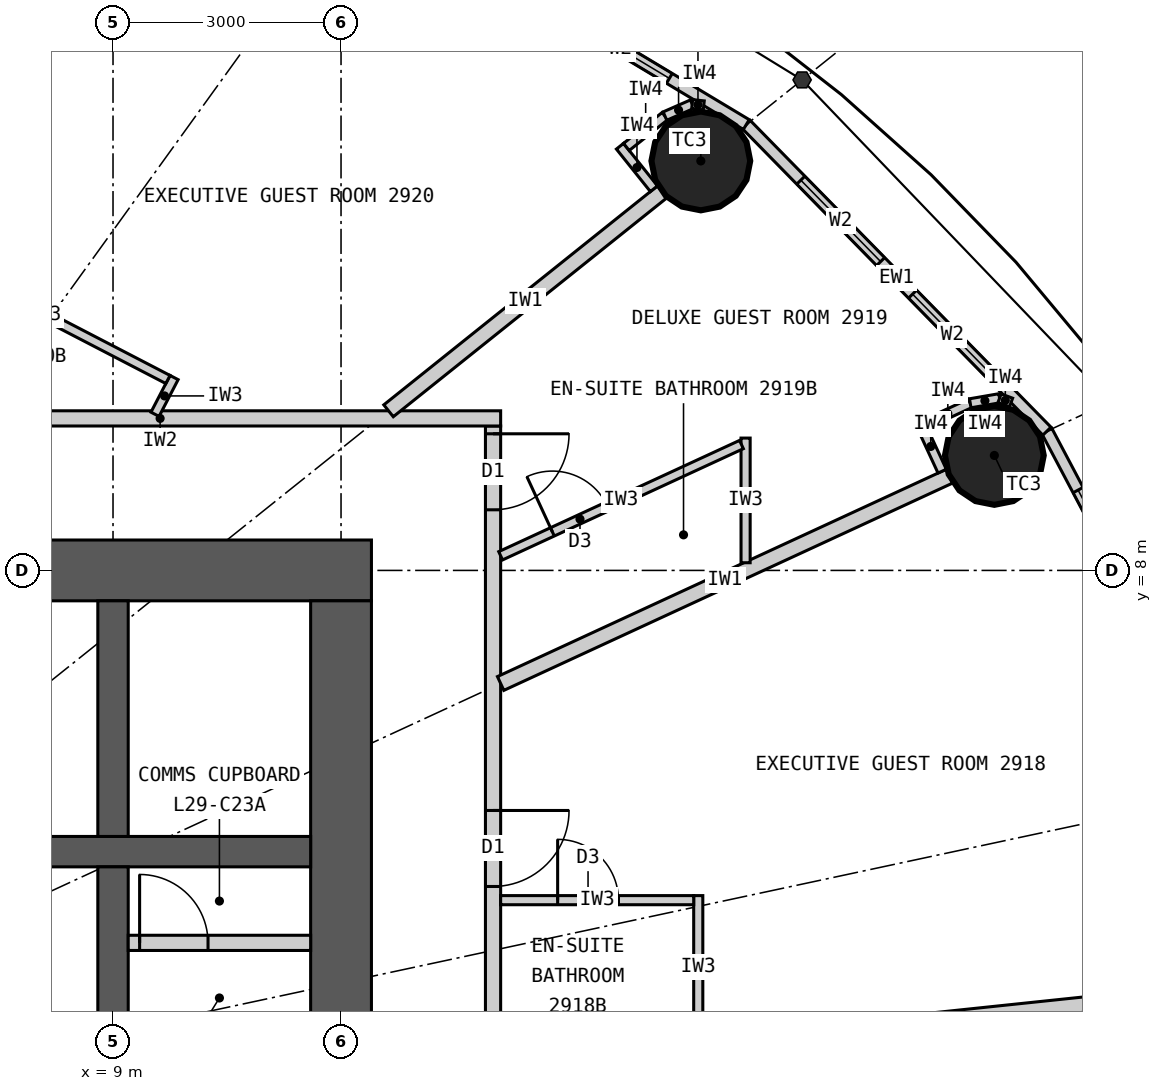
"""IFC4 building model, lengths in metres.
Left out: names, types, materials, properties, quantities, classifications, styles, units other than length and angle.
Written with IfcOpenShell. Run it as: python <this file> out.ifc"""

import sys

from ifc_helpers import new_model, si_unit, direction, frame, frame_2d, origin, origin_2d, place, context, subcontext, project, spatial, rectangle, circle, extrude, element, fill, save


model = new_model("IFC4")
c1 = context("Model", 3, precision=1e-05, world=origin(), true_north=direction((0.0, 1.0)))
c2 = subcontext(c1, "Body", "Model", "MODEL_VIEW")
j1 = project(units=[si_unit("LENGTHUNIT", "METRE"), si_unit("PLANEANGLEUNIT", "RADIAN")], contexts=[c1])
p1 = place(None, origin())
s1 = spatial("IfcSite", under=j1, at=p1, CompositionType="ELEMENT")
p2 = place(p1, origin())
s2 = spatial("IfcBuilding", under=s1, at=p2, CompositionType="ELEMENT")
p3 = place(p2, frame((0.0, 0.0, 115.5)))
s3 = spatial("IfcBuildingStorey", under=s2, at=p3, CompositionType="ELEMENT", Elevation=115.5)
for number, where, z_axis, x_axis in (
    (1, (20.596, 9.513, 0.0), (0.0, 0.0, 1.0), (1.0, 0.0, 0.0)),
    (2, (16.734, 13.387, 0.0), (0.0, 0.0, 1.0), (1.0, 0.0, 0.0)),
):
    element("IfcColumn", number, at=place(p3, frame(where, z_axis=z_axis, x_axis=x_axis)), inside=s3, PredefinedType="COLUMN", context=c2, shape_type="SweptSolid", body=[
        extrude(circle(Radius=0.65, at=origin_2d()), origin(), (0.0, 0.0, 1.0), 3.3),
    ])
p4 = place(p3, frame((-12.4, 8.0, 0.0), z_axis=(0.0, 0.0, 1.0), x_axis=(1.0, 0.0, 0.0)))
e3 = element("IfcWall", 3, at=p4, inside=s3, PredefinedType="SHEAR", context=c2, shape_type="SweptSolid", body=[
    extrude(rectangle(XDim=24.8, YDim=0.8, at=frame_2d((12.4, 0.0))), origin(), (0.0, 0.0, 1.0), 3.3),
])
p5 = place(p4, frame((11.1, 0.0, 0.0)))
e4 = element("IfcOpeningElement", 4, at=p5, cuts=e3, PredefinedType="OPENING", context=c2, shape_type="SweptSolid", body=[
    extrude(rectangle(XDim=1.2, YDim=2.2, at=frame_2d((0.6, 1.1))), frame((0.0, 0.41, 0.0), z_axis=(0.0, -1.0, 0.0), x_axis=(1.0, 0.0, 0.0)), (0.0, 0.0, 1.0), 0.82),
])
p6 = place(p4, frame((18.7, 0.0, 0.0)))
e5 = element("IfcOpeningElement", 5, at=p6, cuts=e3, PredefinedType="OPENING", context=c2, shape_type="SweptSolid", body=[
    extrude(rectangle(XDim=0.9, YDim=2.2, at=frame_2d((0.45, 1.1))), frame((0.0, 0.41, 0.0), z_axis=(0.0, -1.0, 0.0), x_axis=(1.0, 0.0, 0.0)), (0.0, 0.0, 1.0), 0.82),
])
p7 = place(p3, frame((12.0, -7.6, 0.0), z_axis=(0.0, 0.0, 1.0), x_axis=(0.0, 1.0, 0.0)))
e6 = element("IfcWall", 6, at=p7, inside=s3, PredefinedType="SHEAR", context=c2, shape_type="SweptSolid", body=[
    extrude(rectangle(XDim=15.2, YDim=0.8, at=frame_2d((7.6, 0.0))), origin(), (0.0, 0.0, 1.0), 3.3),
])
p8 = place(p7, frame((6.7, 0.0, 0.0)))
e7 = element("IfcOpeningElement", 7, at=p8, cuts=e6, PredefinedType="OPENING", context=c2, shape_type="SweptSolid", body=[
    extrude(rectangle(XDim=1.8, YDim=2.2, at=frame_2d((0.9, 1.1))), frame((0.0, 0.41, 0.0), z_axis=(0.0, -1.0, 0.0), x_axis=(1.0, 0.0, 0.0)), (0.0, 0.0, 1.0), 0.82),
])
p9 = place(p3, frame((-11.6, 4.3, 0.0), z_axis=(0.0, 0.0, 1.0), x_axis=(1.0, 0.0, 0.0)))
e8 = element("IfcWall", 8, at=p9, inside=s3, PredefinedType="SHEAR", context=c2, shape_type="SweptSolid", body=[
    extrude(rectangle(XDim=23.2, YDim=0.4, at=frame_2d((11.6, 0.0))), origin(), (0.0, 0.0, 1.0), 3.3),
])
p10 = place(p3, frame((9.0, 4.5, 0.0), z_axis=(0.0, 0.0, 1.0), x_axis=(0.0, 1.0, 0.0)))
e9 = element("IfcWall", 9, at=p10, inside=s3, PredefinedType="SHEAR", context=c2, shape_type="SweptSolid", body=[
    extrude(rectangle(XDim=3.1, YDim=0.4, at=frame_2d((1.55, 0.0))), origin(), (0.0, 0.0, 1.0), 3.3),
])
p11 = place(p3, frame((9.0, 1.75, 0.0), z_axis=(0.0, 0.0, 1.0), x_axis=(0.0, 1.0, 0.0)))
e10 = element("IfcWall", 10, at=p11, inside=s3, PredefinedType="SHEAR", context=c2, shape_type="SweptSolid", body=[
    extrude(rectangle(XDim=2.35, YDim=0.4, at=frame_2d((1.175, 0.0))), origin(), (0.0, 0.0, 1.0), 3.3),
])
p12 = place(p3, frame((23.792, 5.1, 0.0), z_axis=(0.0, 0.0, 1.0), x_axis=(-0.467814388454, 0.883826735257, 0.0)))
e11 = element("IfcWall", 11, at=p12, inside=s3, PredefinedType="ELEMENTEDWALL", context=c2, shape_type="SweptSolid", body=[
    extrude(rectangle(XDim=5.354, YDim=0.15, at=frame_2d((2.677, 0.0))), origin(), (0.0, 0.0, 1.0), 3.12),
])
p13 = place(p12, frame((0.877, 0.0, 0.9)))
e12 = element("IfcOpeningElement", 12, at=p13, cuts=e11, PredefinedType="OPENING", context=c2, shape_type="SweptSolid", body=[
    extrude(rectangle(XDim=1.5, YDim=1.9, at=frame_2d((0.75, 0.95))), frame((0.0, 0.085, 0.0), z_axis=(0.0, -1.0, 0.0), x_axis=(1.0, 0.0, 0.0)), (0.0, 0.0, 1.0), 0.17),
])
p14 = place(p12, frame((2.977, 0.0, 0.9)))
e13 = element("IfcOpeningElement", 13, at=p14, cuts=e11, PredefinedType="OPENING", context=c2, shape_type="SweptSolid", body=[
    extrude(rectangle(XDim=1.5, YDim=1.9, at=frame_2d((0.75, 0.95))), frame((0.0, 0.085, 0.0), z_axis=(0.0, -1.0, 0.0), x_axis=(1.0, 0.0, 0.0)), (0.0, 0.0, 1.0), 0.17),
])
p15 = place(p3, frame((21.287, 9.832, 0.0), z_axis=(0.0, 0.0, 1.0), x_axis=(-0.700136650834, 0.714008872605, 0.0)))
e14 = element("IfcWall", 14, at=p15, inside=s3, PredefinedType="ELEMENTEDWALL", context=c2, shape_type="SweptSolid", body=[
    extrude(rectangle(XDim=5.649, YDim=0.15, at=frame_2d((2.825, 0.0))), origin(), (0.0, 0.0, 1.0), 3.12),
])
p16 = place(p15, frame((1.025, 0.0, 0.9)))
e15 = element("IfcOpeningElement", 15, at=p16, cuts=e14, PredefinedType="OPENING", context=c2, shape_type="SweptSolid", body=[
    extrude(rectangle(XDim=1.5, YDim=1.9, at=frame_2d((0.75, 0.95))), frame((0.0, 0.085, 0.0), z_axis=(0.0, -1.0, 0.0), x_axis=(1.0, 0.0, 0.0)), (0.0, 0.0, 1.0), 0.17),
])
p17 = place(p15, frame((3.125, 0.0, 0.9)))
e16 = element("IfcOpeningElement", 16, at=p17, cuts=e14, PredefinedType="OPENING", context=c2, shape_type="SweptSolid", body=[
    extrude(rectangle(XDim=1.5, YDim=1.9, at=frame_2d((0.75, 0.95))), frame((0.0, 0.085, 0.0), z_axis=(0.0, -1.0, 0.0), x_axis=(1.0, 0.0, 0.0)), (0.0, 0.0, 1.0), 0.17),
])
p18 = place(p3, frame((17.332, 13.866, 0.0), z_axis=(0.0, 0.0, 1.0), x_axis=(-0.857308573723, 0.514802884044, 0.0)))
e17 = element("IfcWall", 17, at=p18, inside=s3, PredefinedType="ELEMENTEDWALL", context=c2, shape_type="SweptSolid", body=[
    extrude(rectangle(XDim=5.961, YDim=0.15, at=frame_2d((2.98, 0.0))), origin(), (0.0, 0.0, 1.0), 3.12),
])
p19 = place(p18, frame((1.181, 0.0, 0.9)))
e18 = element("IfcOpeningElement", 18, at=p19, cuts=e17, PredefinedType="OPENING", context=c2, shape_type="SweptSolid", body=[
    extrude(rectangle(XDim=1.5, YDim=1.9, at=frame_2d((0.75, 0.95))), frame((0.0, 0.085, 0.0), z_axis=(0.0, -1.0, 0.0), x_axis=(1.0, 0.0, 0.0)), (0.0, 0.0, 1.0), 0.17),
])
p20 = place(p18, frame((3.281, 0.0, 0.9)))
e19 = element("IfcOpeningElement", 19, at=p20, cuts=e17, PredefinedType="OPENING", context=c2, shape_type="SweptSolid", body=[
    extrude(rectangle(XDim=1.5, YDim=1.9, at=frame_2d((0.75, 0.95))), frame((0.0, 0.085, 0.0), z_axis=(0.0, -1.0, 0.0), x_axis=(1.0, 0.0, 0.0)), (0.0, 0.0, 1.0), 0.17),
])
p21 = place(p3, frame((14.0, -9.9, 0.0), z_axis=(0.0, 0.0, 1.0), x_axis=(0.0, 1.0, 0.0)))
e20 = element("IfcWall", 20, at=p21, inside=s3, PredefinedType="PARTITIONING", context=c2, shape_type="SweptSolid", body=[
    extrude(rectangle(XDim=19.8, YDim=0.2, at=frame_2d((9.9, 0.0))), origin(), (0.0, 0.0, 1.0), 3.12),
])
p22 = place(p21, frame((3.318, 0.0, 0.0)))
e21 = element("IfcOpeningElement", 21, at=p22, cuts=e20, PredefinedType="OPENING", context=c2, shape_type="SweptSolid", body=[
    extrude(rectangle(XDim=1.0, YDim=2.2, at=frame_2d((0.5, 1.1))), frame((0.0, 0.11, 0.0), z_axis=(0.0, -1.0, 0.0), x_axis=(1.0, 0.0, 0.0)), (0.0, 0.0, 1.0), 0.22),
])
p23 = place(p21, frame((9.238, 0.0, 0.0)))
e22 = element("IfcOpeningElement", 22, at=p23, cuts=e20, PredefinedType="OPENING", context=c2, shape_type="SweptSolid", body=[
    extrude(rectangle(XDim=1.0, YDim=2.2, at=frame_2d((0.5, 1.1))), frame((0.0, 0.11, 0.0), z_axis=(0.0, -1.0, 0.0), x_axis=(1.0, 0.0, 0.0)), (0.0, 0.0, 1.0), 0.22),
])
p24 = place(p21, frame((13.742, 0.0, 0.0)))
e23 = element("IfcOpeningElement", 23, at=p24, cuts=e20, PredefinedType="OPENING", context=c2, shape_type="SweptSolid", body=[
    extrude(rectangle(XDim=1.0, YDim=2.2, at=frame_2d((0.5, 1.1))), frame((0.0, 0.11, 0.0), z_axis=(0.0, -1.0, 0.0), x_axis=(1.0, 0.0, 0.0)), (0.0, 0.0, 1.0), 0.22),
])
p25 = place(p21, frame((18.698, 0.0, 0.0)))
e24 = element("IfcOpeningElement", 24, at=p25, cuts=e20, PredefinedType="OPENING", context=c2, shape_type="SweptSolid", body=[
    extrude(rectangle(XDim=1.0, YDim=2.2, at=frame_2d((0.5, 1.1))), frame((0.0, 0.11, 0.0), z_axis=(0.0, -1.0, 0.0), x_axis=(1.0, 0.0, 0.0)), (0.0, 0.0, 1.0), 0.22),
])
p26 = place(p3, frame((5.139, 10.0, 0.0), z_axis=(0.0, 0.0, 1.0), x_axis=(1.0, 0.0, 0.0)))
e25 = element("IfcWall", 25, at=p26, inside=s3, PredefinedType="PARTITIONING", context=c2, shape_type="SweptSolid", body=[
    extrude(rectangle(XDim=8.961, YDim=0.2, at=frame_2d((4.48, 0.0))), origin(), (0.0, 0.0, 1.0), 3.12),
])
p27 = place(p3, frame((14.1, 1.482, 0.0), z_axis=(0.0, 0.0, 1.0), x_axis=(0.994523202615, 0.104516024894, 0.0)))
e26 = element("IfcWall", 26, at=p27, inside=s3, PredefinedType="PARTITIONING", context=c2, shape_type="SweptSolid", body=[
    extrude(rectangle(XDim=10.091, YDim=0.2, at=frame_2d((5.045, 0.0))), origin(), (0.0, 0.0, 1.0), 2.47),
])
p28 = place(p3, frame((14.1, 6.512, 0.0), z_axis=(0.0, 0.0, 1.0), x_axis=(0.907833019998, 0.419331858797, 0.0)))
e27 = element("IfcWall", 27, at=p28, inside=s3, PredefinedType="PARTITIONING", context=c2, shape_type="SweptSolid", body=[
    extrude(rectangle(XDim=6.505, YDim=0.2, at=frame_2d((3.252, 0.0))), origin(), (0.0, 0.0, 1.0), 2.27),
])
p29 = place(p3, frame((12.625, 10.1, 0.0), z_axis=(0.0, 0.0, 1.0), x_axis=(0.780863644897, 0.624701503182, 0.0)))
e28 = element("IfcWall", 28, at=p29, inside=s3, PredefinedType="PARTITIONING", context=c2, shape_type="SweptSolid", body=[
    extrude(rectangle(XDim=4.612, YDim=0.2, at=frame_2d((2.306, 0.0))), origin(), (0.0, 0.0, 1.0), 2.37),
])
p30 = place(p3, frame((5.239, 10.1, 0.0), z_axis=(0.0, 0.0, 1.0), x_axis=(0.4604797896, 0.887670188398, 0.0)))
e29 = element("IfcWall", 29, at=p30, inside=s3, PredefinedType="PARTITIONING", context=c2, shape_type="SweptSolid", body=[
    extrude(rectangle(XDim=8.676, YDim=0.2, at=frame_2d((4.338, 0.0))), origin(), (0.0, 0.0, 1.0), 3.12),
])
p31 = place(p30, frame((2.61, 0.0, 0.0)))
e30 = element("IfcOpeningElement", 30, at=p31, cuts=e29, PredefinedType="OPENING", context=c2, shape_type="SweptSolid", body=[
    extrude(rectangle(XDim=1.0, YDim=2.2, at=frame_2d((0.5, 1.1))), frame((0.0, 0.11, 0.0), z_axis=(0.0, -1.0, 0.0), x_axis=(1.0, 0.0, 0.0)), (0.0, 0.0, 1.0), 0.22),
])
p32 = place(p3, frame((16.7, 1.855, 0.0), z_axis=(0.0, 0.0, 1.0), x_axis=(0.0, 1.0, 0.0)))
e31 = element("IfcWall", 31, at=p32, inside=s3, PredefinedType="PARTITIONING", context=c2, shape_type="SweptSolid", body=[
    extrude(rectangle(XDim=1.867, YDim=0.12, at=frame_2d((0.933, 0.0))), origin(), (0.0, 0.0, 1.0), 3.12),
])
p33 = place(p3, frame((14.1, 3.662, 0.0), z_axis=(0.0, 0.0, 1.0), x_axis=(1.0, 0.0, 0.0)))
e32 = element("IfcWall", 32, at=p33, inside=s3, PredefinedType="PARTITIONING", context=c2, shape_type="SweptSolid", body=[
    extrude(rectangle(XDim=2.54, YDim=0.12, at=frame_2d((1.27, 0.0))), origin(), (0.0, 0.0, 1.0), 2.37),
])
p34 = place(p33, frame((0.75, 0.0, 0.0)))
e33 = element("IfcOpeningElement", 33, at=p34, cuts=e32, PredefinedType="OPENING", context=c2, shape_type="SweptSolid", body=[
    extrude(rectangle(XDim=0.8, YDim=2.1, at=frame_2d((0.4, 1.05))), frame((0.0, 0.07, 0.0), z_axis=(0.0, -1.0, 0.0), x_axis=(1.0, 0.0, 0.0)), (0.0, 0.0, 1.0), 0.14),
])
p35 = place(p3, frame((17.323, 8.101, 0.0), z_axis=(0.0, 0.0, 1.0), x_axis=(0.0, 1.0, 0.0)))
e34 = element("IfcWall", 34, at=p35, inside=s3, PredefinedType="PARTITIONING", context=c2, shape_type="SweptSolid", body=[
    extrude(rectangle(XDim=1.64, YDim=0.12, at=frame_2d((0.82, 0.0))), origin(), (0.0, 0.0, 1.0), 3.12),
])
p36 = place(p3, frame((14.1, 8.193, 0.0), z_axis=(0.0, 0.0, 1.0), x_axis=(0.907836493557, 0.419324338628, 0.0)))
e35 = element("IfcWall", 35, at=p36, inside=s3, PredefinedType="PARTITIONING", context=c2, shape_type="SweptSolid", body=[
    extrude(rectangle(XDim=3.49, YDim=0.12, at=frame_2d((1.745, 0.0))), origin(), (0.0, 0.0, 1.0), 3.12),
])
p37 = place(p36, frame((0.75, 0.0, 0.0)))
e36 = element("IfcOpeningElement", 36, at=p37, cuts=e35, PredefinedType="OPENING", context=c2, shape_type="SweptSolid", body=[
    extrude(rectangle(XDim=0.8, YDim=2.1, at=frame_2d((0.4, 1.05))), frame((0.0, 0.07, 0.0), z_axis=(0.0, -1.0, 0.0), x_axis=(1.0, 0.0, 0.0)), (0.0, 0.0, 1.0), 0.14),
])
p38 = place(p3, frame((9.552, 10.054, 0.0), z_axis=(0.0, 0.0, 1.0), x_axis=(0.460604866949, 0.887605293215, 0.0)))
e37 = element("IfcWall", 37, at=p38, inside=s3, PredefinedType="PARTITIONING", context=c2, shape_type="SweptSolid", body=[
    extrude(rectangle(XDim=0.545, YDim=0.12, at=frame_2d((0.272, 0.0))), origin(), (0.0, 0.0, 1.0), 3.12),
])
p39 = place(p3, frame((6.447, 12.211, 0.0), z_axis=(0.0, 0.0, 1.0), x_axis=(0.887685422499, -0.460450421525, 0.0)))
e38 = element("IfcWall", 38, at=p39, inside=s3, PredefinedType="PARTITIONING", context=c2, shape_type="SweptSolid", body=[
    extrude(rectangle(XDim=3.69, YDim=0.12, at=frame_2d((1.845, 0.0))), origin(), (0.0, 0.0, 1.0), 3.12),
])
p40 = place(p39, frame((0.75, 0.0, 0.0)))
e39 = element("IfcOpeningElement", 39, at=p40, cuts=e38, PredefinedType="OPENING", context=c2, shape_type="SweptSolid", body=[
    extrude(rectangle(XDim=0.8, YDim=2.1, at=frame_2d((0.4, 1.05))), frame((0.0, 0.07, 0.0), z_axis=(0.0, -1.0, 0.0), x_axis=(1.0, 0.0, 0.0)), (0.0, 0.0, 1.0), 0.14),
])
p41 = place(p3, frame((9.2, 3.1, 0.0), z_axis=(0.0, 0.0, 1.0), x_axis=(1.0, 0.0, 0.0)))
e40 = element("IfcWall", 40, at=p41, inside=s3, PredefinedType="PARTITIONING", context=c2, shape_type="SweptSolid", body=[
    extrude(rectangle(XDim=2.4, YDim=0.2, at=frame_2d((1.2, 0.0))), origin(), (0.0, 0.0, 1.0), 3.12),
])
p42 = place(p41, frame((0.15, 0.0, 0.0)))
e41 = element("IfcOpeningElement", 41, at=p42, cuts=e40, PredefinedType="OPENING", context=c2, shape_type="SweptSolid", body=[
    extrude(rectangle(XDim=0.9, YDim=2.2, at=frame_2d((0.45, 1.1))), frame((0.0, 0.11, 0.0), z_axis=(0.0, -1.0, 0.0), x_axis=(1.0, 0.0, 0.0)), (0.0, 0.0, 1.0), 0.22),
])
p43 = place(p3, frame((19.909, 9.306, 0.0), z_axis=(0.0, 0.0, 1.0), x_axis=(-0.419296148934, 0.90784951368, 0.0)))
e42 = element("IfcWall", 42, at=p43, inside=s3, PredefinedType="PARTITIONING", context=c2, shape_type="SweptSolid", body=[
    extrude(rectangle(XDim=0.716, YDim=0.12, at=frame_2d((0.358, 0.0))), origin(), (0.0, 0.0, 1.0), 3.12),
])
p44 = place(p3, frame((19.689, 9.926, 0.0), z_axis=(0.0, 0.0, 1.0), x_axis=(0.907893409272, 0.419201094227, 0.0)))
e43 = element("IfcWall", 43, at=p44, inside=s3, PredefinedType="PARTITIONING", context=c2, shape_type="SweptSolid", body=[
    extrude(rectangle(XDim=0.65, YDim=0.12, at=frame_2d((0.325, 0.0))), origin(), (0.0, 0.0, 1.0), 3.12),
])
p45 = place(p3, frame((20.279, 10.199, 0.0), z_axis=(0.0, 0.0, 1.0), x_axis=(0.985380740712, 0.170366651181, 0.0)))
e44 = element("IfcWall", 44, at=p45, inside=s3, PredefinedType="PARTITIONING", context=c2, shape_type="SweptSolid", body=[
    extrude(rectangle(XDim=0.391, YDim=0.12, at=frame_2d((0.196, 0.0))), origin(), (0.0, 0.0, 1.0), 3.12),
])
p46 = place(p3, frame((20.664, 10.265, 0.0), z_axis=(0.0, 0.0, 1.0), x_axis=(0.938058651481, -0.346476501918, 0.0)))
e45 = element("IfcWall", 45, at=p46, inside=s3, PredefinedType="PARTITIONING", context=c2, shape_type="SweptSolid", body=[
    extrude(rectangle(XDim=0.161, YDim=0.12, at=frame_2d((0.081, 0.0))), origin(), (0.0, 0.0, 1.0), 3.12),
])
p47 = place(p3, frame((16.117, 13.022, 0.0), z_axis=(0.0, 0.0, 1.0), x_axis=(-0.62465344249, 0.780902091677, 0.0)))
e46 = element("IfcWall", 46, at=p47, inside=s3, PredefinedType="PARTITIONING", context=c2, shape_type="SweptSolid", body=[
    extrude(rectangle(XDim=0.716, YDim=0.12, at=frame_2d((0.358, 0.0))), origin(), (0.0, 0.0, 1.0), 3.12),
])
p48 = place(p3, frame((15.754, 13.571, 0.0), z_axis=(0.0, 0.0, 1.0), x_axis=(0.780905453553, 0.624649239663, 0.0)))
e47 = element("IfcWall", 47, at=p48, inside=s3, PredefinedType="PARTITIONING", context=c2, shape_type="SweptSolid", body=[
    extrude(rectangle(XDim=0.65, YDim=0.12, at=frame_2d((0.325, 0.0))), origin(), (0.0, 0.0, 1.0), 3.12),
])
p49 = place(p3, frame((16.262, 13.977, 0.0), z_axis=(0.0, 0.0, 1.0), x_axis=(0.915985403703, 0.401211590314, 0.0)))
e48 = element("IfcWall", 48, at=p49, inside=s3, PredefinedType="PARTITIONING", context=c2, shape_type="SweptSolid", body=[
    extrude(rectangle(XDim=0.391, YDim=0.12, at=frame_2d((0.196, 0.0))), origin(), (0.0, 0.0, 1.0), 3.12),
])
p50 = place(p3, frame((16.62, 14.134, 0.0), z_axis=(0.0, 0.0, 1.0), x_axis=(0.993941871493, -0.109907033867, 0.0)))
e49 = element("IfcWall", 49, at=p50, inside=s3, PredefinedType="PARTITIONING", context=c2, shape_type="SweptSolid", body=[
    extrude(rectangle(XDim=0.153, YDim=0.12, at=frame_2d((0.077, 0.0))), origin(), (0.0, 0.0, 1.0), 3.12),
])
p51 = place(p14, origin())
e50 = element("IfcWindow", 50, at=p51, inside=s3, PartitioningType="SINGLE_PANEL", PredefinedType="WINDOW", context=c2, shape_type="SweptSolid", body=[
    extrude(rectangle(XDim=1.5, YDim=1.9, at=frame_2d((0.75, 0.95))), frame((0.0, 0.03, 0.0), z_axis=(0.0, -1.0, 0.0), x_axis=(1.0, 0.0, 0.0)), (0.0, 0.0, 1.0), 0.06),
])
fill(e13, e50)
p52 = place(p16, origin())
e51 = element("IfcWindow", 51, at=p52, inside=s3, PartitioningType="SINGLE_PANEL", PredefinedType="WINDOW", context=c2, shape_type="SweptSolid", body=[
    extrude(rectangle(XDim=1.5, YDim=1.9, at=frame_2d((0.75, 0.95))), frame((0.0, 0.03, 0.0), z_axis=(0.0, -1.0, 0.0), x_axis=(1.0, 0.0, 0.0)), (0.0, 0.0, 1.0), 0.06),
])
fill(e15, e51)
p53 = place(p17, origin())
e52 = element("IfcWindow", 52, at=p53, inside=s3, PartitioningType="SINGLE_PANEL", PredefinedType="WINDOW", context=c2, shape_type="SweptSolid", body=[
    extrude(rectangle(XDim=1.5, YDim=1.9, at=frame_2d((0.75, 0.95))), frame((0.0, 0.03, 0.0), z_axis=(0.0, -1.0, 0.0), x_axis=(1.0, 0.0, 0.0)), (0.0, 0.0, 1.0), 0.06),
])
fill(e16, e52)
p54 = place(p19, origin())
e53 = element("IfcWindow", 53, at=p54, inside=s3, PartitioningType="SINGLE_PANEL", PredefinedType="WINDOW", context=c2, shape_type="SweptSolid", body=[
    extrude(rectangle(XDim=1.5, YDim=1.9, at=frame_2d((0.75, 0.95))), frame((0.0, 0.03, 0.0), z_axis=(0.0, -1.0, 0.0), x_axis=(1.0, 0.0, 0.0)), (0.0, 0.0, 1.0), 0.06),
])
fill(e18, e53)
p55 = place(p34, origin())
e54 = element("IfcDoor", 54, at=p55, inside=s3, OperationType="SINGLE_SWING_LEFT", PredefinedType="DOOR", context=c2, shape_type="SweptSolid", body=[
    extrude(rectangle(XDim=0.8, YDim=2.1, at=frame_2d((0.4, 1.05))), frame((0.0, 0.025, 0.0), z_axis=(0.0, -1.0, 0.0), x_axis=(1.0, 0.0, 0.0)), (0.0, 0.0, 1.0), 0.05),
])
fill(e33, e54)
p56 = place(p24, origin())
e55 = element("IfcDoor", 55, at=p56, inside=s3, OperationType="SINGLE_SWING_RIGHT", PredefinedType="DOOR", context=c2, shape_type="SweptSolid", body=[
    extrude(rectangle(XDim=1.0, YDim=2.2, at=frame_2d((0.5, 1.1))), frame((0.0, 0.025, 0.0), z_axis=(0.0, -1.0, 0.0), x_axis=(1.0, 0.0, 0.0)), (0.0, 0.0, 1.0), 0.05),
])
fill(e23, e55)
p57 = place(p37, origin())
e56 = element("IfcDoor", 56, at=p57, inside=s3, OperationType="SINGLE_SWING_LEFT", PredefinedType="DOOR", context=c2, shape_type="SweptSolid", body=[
    extrude(rectangle(XDim=0.8, YDim=2.1, at=frame_2d((0.4, 1.05))), frame((0.0, 0.025, 0.0), z_axis=(0.0, -1.0, 0.0), x_axis=(1.0, 0.0, 0.0)), (0.0, 0.0, 1.0), 0.05),
])
fill(e36, e56)
p58 = place(p25, origin())
e57 = element("IfcDoor", 57, at=p58, inside=s3, OperationType="SINGLE_SWING_RIGHT", PredefinedType="DOOR", context=c2, shape_type="SweptSolid", body=[
    extrude(rectangle(XDim=1.0, YDim=2.2, at=frame_2d((0.5, 1.1))), frame((0.0, 0.025, 0.0), z_axis=(0.0, -1.0, 0.0), x_axis=(1.0, 0.0, 0.0)), (0.0, 0.0, 1.0), 0.05),
])
fill(e24, e57)
p59 = place(p42, origin())
e58 = element("IfcDoor", 58, at=p59, inside=s3, OperationType="SINGLE_SWING_LEFT", PredefinedType="DOOR", context=c2, shape_type="SweptSolid", body=[
    extrude(rectangle(XDim=0.9, YDim=2.2, at=frame_2d((0.45, 1.1))), frame((0.0, 0.025, 0.0), z_axis=(0.0, -1.0, 0.0), x_axis=(1.0, 0.0, 0.0)), (0.0, 0.0, 1.0), 0.05),
])
fill(e41, e58)
save(model, sys.argv[1])
